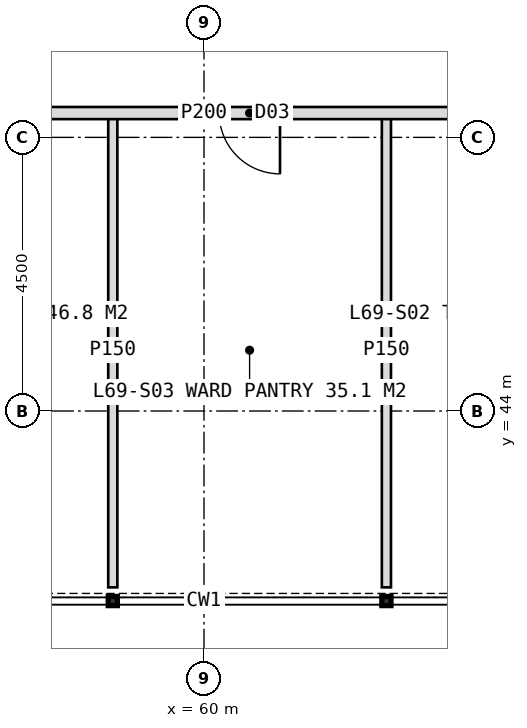
"""IFC4 building model, lengths in metres.
Left out: names, types, materials, properties, quantities, classifications, styles, units other than length and angle.
Written with IfcOpenShell. Run it as: python <this file> out.ifc"""

import sys

from ifc_helpers import new_model, si_unit, direction, frame, frame_2d, origin, place, context, subcontext, project, spatial, rectangle, extrude, element, fill, save


model = new_model("IFC4")
c1 = context("Model", 3, precision=1e-05, world=origin(), true_north=direction((0.0, 1.0)))
c2 = subcontext(c1, "Body", "Model", "MODEL_VIEW")
j1 = project(units=[si_unit("LENGTHUNIT", "METRE"), si_unit("PLANEANGLEUNIT", "RADIAN")], contexts=[c1])
p1 = place(None, origin())
s1 = spatial("IfcSite", under=j1, at=p1, CompositionType="ELEMENT")
p2 = place(p1, origin())
s2 = spatial("IfcBuilding", under=s1, at=p2, CompositionType="ELEMENT")
p3 = place(p2, frame((0.0, 0.0, 286.0)))
s3 = spatial("IfcBuildingStorey", under=s2, at=p3, CompositionType="ELEMENT", Elevation=286.0)
for number, where, z_axis, x_axis in (
    (1, (63.0, 48.9, 0.0), (0.0, 0.0, 1.0), (0.0, -1.0, 0.0)),
    (2, (58.5, 48.9, 0.0), (0.0, 0.0, 1.0), (0.0, -1.0, 0.0)),
):
    element("IfcWall", number, at=place(p3, frame(where, z_axis=z_axis, x_axis=x_axis)), inside=s3, PredefinedType="PARTITIONING", context=c2, shape_type="SweptSolid", body=[
        extrude(rectangle(XDim=7.8, YDim=0.15, at=frame_2d((3.9, 0.0))), origin(), (0.0, 0.0, 1.0), 3.75),
    ])
p4 = place(p3, frame((73.1, 48.9, 0.0), z_axis=(0.0, 0.0, 1.0), x_axis=(-1.0, 0.0, 0.0)))
e3 = element("IfcWall", 3, at=p4, inside=s3, PredefinedType="PARTITIONING", context=c2, shape_type="SweptSolid", body=[
    extrude(rectangle(XDim=26.2, YDim=0.2, at=frame_2d((13.1, 0.0))), origin(), (0.0, 0.0, 1.0), 3.75),
])
p5 = place(p4, frame((1.75, 0.0, 0.0)))
e4 = element("IfcOpeningElement", 4, at=p5, cuts=e3, PredefinedType="OPENING", context=c2, shape_type="SweptSolid", body=[
    extrude(rectangle(XDim=1.2, YDim=2.2, at=frame_2d((0.6, 1.1))), frame((0.0, 0.11, 0.0), z_axis=(0.0, -1.0, 0.0), x_axis=(1.0, 0.0, 0.0)), (0.0, 0.0, 1.0), 0.22),
])
p6 = place(p4, frame((6.75, 0.0, 0.0)))
e5 = element("IfcOpeningElement", 5, at=p6, cuts=e3, PredefinedType="OPENING", context=c2, shape_type="SweptSolid", body=[
    extrude(rectangle(XDim=1.0, YDim=2.1, at=frame_2d((0.5, 1.05))), frame((0.0, 0.11, 0.0), z_axis=(0.0, -1.0, 0.0), x_axis=(1.0, 0.0, 0.0)), (0.0, 0.0, 1.0), 0.22),
])
p7 = place(p4, frame((11.85, 0.0, 0.0)))
e6 = element("IfcOpeningElement", 6, at=p7, cuts=e3, PredefinedType="OPENING", context=c2, shape_type="SweptSolid", body=[
    extrude(rectangle(XDim=1.0, YDim=2.1, at=frame_2d((0.5, 1.05))), frame((0.0, 0.11, 0.0), z_axis=(0.0, -1.0, 0.0), x_axis=(1.0, 0.0, 0.0)), (0.0, 0.0, 1.0), 0.22),
])
p8 = place(p4, frame((15.75, 0.0, 0.0)))
e7 = element("IfcOpeningElement", 7, at=p8, cuts=e3, PredefinedType="OPENING", context=c2, shape_type="SweptSolid", body=[
    extrude(rectangle(XDim=1.0, YDim=2.1, at=frame_2d((0.5, 1.05))), frame((0.0, 0.11, 0.0), z_axis=(0.0, -1.0, 0.0), x_axis=(1.0, 0.0, 0.0)), (0.0, 0.0, 1.0), 0.22),
])
p9 = place(p4, frame((23.25, 0.0, 0.0)))
e8 = element("IfcOpeningElement", 8, at=p9, cuts=e3, PredefinedType="OPENING", context=c2, shape_type="SweptSolid", body=[
    extrude(rectangle(XDim=1.2, YDim=2.2, at=frame_2d((0.6, 1.1))), frame((0.0, 0.11, 0.0), z_axis=(0.0, -1.0, 0.0), x_axis=(1.0, 0.0, 0.0)), (0.0, 0.0, 1.0), 0.22),
])
p10 = place(p7, origin())
e9 = element("IfcDoor", 9, at=p10, inside=s3, OperationType="SINGLE_SWING_LEFT", PredefinedType="DOOR", context=c2, shape_type="SweptSolid", body=[
    extrude(rectangle(XDim=1.0, YDim=2.1, at=frame_2d((0.5, 1.05))), frame((0.0, 0.025, 0.0), z_axis=(0.0, -1.0, 0.0), x_axis=(1.0, 0.0, 0.0)), (0.0, 0.0, 1.0), 0.05),
])
fill(e6, e9)
save(model, sys.argv[1])
